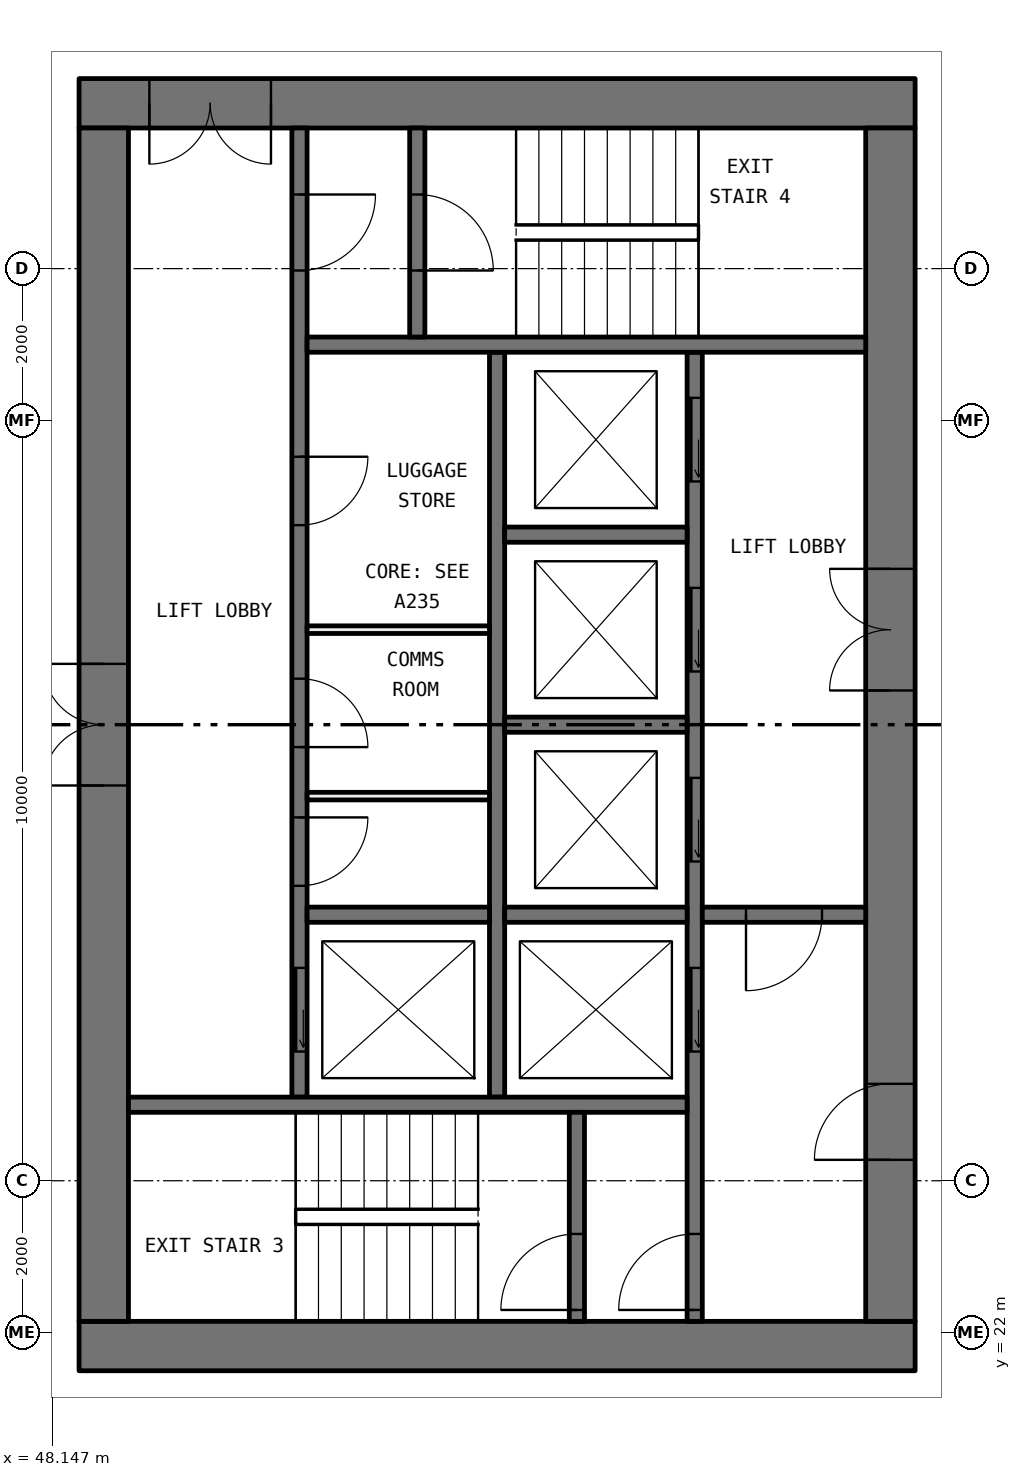
"""IFC4 building model, lengths in metres.
Left out: names, types, materials, properties, quantities, classifications, styles, units other than length and angle.
Written with IfcOpenShell. Run it as: python <this file> out.ifc"""

import sys

from ifc_helpers import new_model, si_unit, direction, frame, frame_2d, origin, place, context, subcontext, project, spatial, rectangle, extrude, element, fill, save


model = new_model("IFC4")
c1 = context("Model", 3, precision=1e-05, world=origin(), true_north=direction((0.0, 1.0)))
c2 = subcontext(c1, "Body", "Model", "MODEL_VIEW")
j1 = project(units=[si_unit("LENGTHUNIT", "METRE"), si_unit("PLANEANGLEUNIT", "RADIAN")], contexts=[c1])
p1 = place(None, origin())
s1 = spatial("IfcSite", under=j1, at=p1, CompositionType="ELEMENT")
p2 = place(p1, origin())
s2 = spatial("IfcBuilding", under=s1, at=p2, CompositionType="ELEMENT")
p3 = place(p2, frame((0.0, 0.0, 131.1)))
s3 = spatial("IfcBuildingStorey", under=s2, at=p3, CompositionType="ELEMENT", Elevation=131.1)
p4 = place(p3, frame((59.5, 21.825, 0.0), z_axis=(0.0, 0.0, 1.0), x_axis=(-1.0, 0.0, 0.0)))
e1 = element("IfcWall", 1, at=p4, inside=s3, PredefinedType="SHEAR", context=c2, shape_type="SweptSolid", body=[
    extrude(rectangle(XDim=11.0, YDim=0.65, at=frame_2d((5.5, 0.0))), origin(), (0.0, 0.0, 1.0), 3.05),
])
p5 = place(p3, frame((59.5, 38.175, 0.0), z_axis=(0.0, 0.0, 1.0), x_axis=(-1.0, 0.0, 0.0)))
e2 = element("IfcWall", 2, at=p5, inside=s3, PredefinedType="SHEAR", context=c2, shape_type="SweptSolid", body=[
    extrude(rectangle(XDim=11.0, YDim=0.65, at=frame_2d((5.5, 0.0))), origin(), (0.0, 0.0, 1.0), 3.05),
])
p6 = place(p5, frame((8.475, 0.0, 0.0)))
e3 = element("IfcOpeningElement", 3, at=p6, cuts=e2, PredefinedType="OPENING", context=c2, shape_type="SweptSolid", body=[
    extrude(rectangle(XDim=1.6, YDim=2.1, at=frame_2d((0.8, 1.05))), frame((0.0, 0.335, 0.0), z_axis=(0.0, -1.0, 0.0), x_axis=(1.0, 0.0, 0.0)), (0.0, 0.0, 1.0), 0.67),
])
p7 = place(p3, frame((59.175, 22.15, 0.0), z_axis=(0.0, 0.0, 1.0), x_axis=(0.0, 1.0, 0.0)))
e4 = element("IfcWall", 4, at=p7, inside=s3, PredefinedType="SHEAR", context=c2, shape_type="SweptSolid", body=[
    extrude(rectangle(XDim=15.7, YDim=0.65, at=frame_2d((7.85, 0.0))), origin(), (0.0, 0.0, 1.0), 3.05),
])
p8 = place(p7, frame((8.3, 0.0, 0.0)))
e5 = element("IfcOpeningElement", 5, at=p8, cuts=e4, PredefinedType="OPENING", context=c2, shape_type="SweptSolid", body=[
    extrude(rectangle(XDim=1.6, YDim=2.1, at=frame_2d((0.8, 1.05))), frame((0.0, 0.335, 0.0), z_axis=(0.0, -1.0, 0.0), x_axis=(1.0, 0.0, 0.0)), (0.0, 0.0, 1.0), 0.67),
])
p9 = place(p7, frame((2.125, 0.0, 0.0)))
e6 = element("IfcOpeningElement", 6, at=p9, cuts=e4, PredefinedType="OPENING", context=c2, shape_type="SweptSolid", body=[
    extrude(rectangle(XDim=1.0, YDim=2.1, at=frame_2d((0.5, 1.05))), frame((0.0, 0.335, 0.0), z_axis=(0.0, -1.0, 0.0), x_axis=(1.0, 0.0, 0.0)), (0.0, 0.0, 1.0), 0.67),
])
p10 = place(p3, frame((48.825, 22.15, 0.0), z_axis=(0.0, 0.0, 1.0), x_axis=(0.0, 1.0, 0.0)))
e7 = element("IfcWall", 7, at=p10, inside=s3, PredefinedType="SHEAR", context=c2, shape_type="SweptSolid", body=[
    extrude(rectangle(XDim=15.7, YDim=0.65, at=frame_2d((7.85, 0.0))), origin(), (0.0, 0.0, 1.0), 3.05),
])
p11 = place(p10, frame((7.05, 0.0, 0.0)))
e8 = element("IfcOpeningElement", 8, at=p11, cuts=e7, PredefinedType="OPENING", context=c2, shape_type="SweptSolid", body=[
    extrude(rectangle(XDim=1.6, YDim=2.1, at=frame_2d((0.8, 1.05))), frame((0.0, 0.335, 0.0), z_axis=(0.0, -1.0, 0.0), x_axis=(1.0, 0.0, 0.0)), (0.0, 0.0, 1.0), 0.67),
])
p12 = place(p3, frame((56.6, 22.15, 0.0), z_axis=(0.0, 0.0, 1.0), x_axis=(0.0, 1.0, 0.0)))
e9 = element("IfcWall", 9, at=p12, inside=s3, PredefinedType="SOLIDWALL", context=c2, shape_type="SweptSolid", body=[
    extrude(rectangle(XDim=12.75, YDim=0.2, at=frame_2d((6.375, 0.0))), origin(), (0.0, 0.0, 1.0), 3.05),
])
p13 = place(p12, frame((3.55, 0.0, 0.0)))
e10 = element("IfcOpeningElement", 10, at=p13, cuts=e9, PredefinedType="OPENING", context=c2, shape_type="SweptSolid", body=[
    extrude(rectangle(XDim=1.1, YDim=2.1, at=frame_2d((0.55, 1.05))), frame((0.0, 0.11, 0.0), z_axis=(0.0, -1.0, 0.0), x_axis=(1.0, 0.0, 0.0)), (0.0, 0.0, 1.0), 0.22),
])
p14 = place(p12, frame((6.05, 0.0, 0.0)))
e11 = element("IfcOpeningElement", 11, at=p14, cuts=e9, PredefinedType="OPENING", context=c2, shape_type="SweptSolid", body=[
    extrude(rectangle(XDim=1.1, YDim=2.1, at=frame_2d((0.55, 1.05))), frame((0.0, 0.11, 0.0), z_axis=(0.0, -1.0, 0.0), x_axis=(1.0, 0.0, 0.0)), (0.0, 0.0, 1.0), 0.22),
])
p15 = place(p12, frame((8.55, 0.0, 0.0)))
e12 = element("IfcOpeningElement", 12, at=p15, cuts=e9, PredefinedType="OPENING", context=c2, shape_type="SweptSolid", body=[
    extrude(rectangle(XDim=1.1, YDim=2.1, at=frame_2d((0.55, 1.05))), frame((0.0, 0.11, 0.0), z_axis=(0.0, -1.0, 0.0), x_axis=(1.0, 0.0, 0.0)), (0.0, 0.0, 1.0), 0.22),
])
p16 = place(p12, frame((11.05, 0.0, 0.0)))
e13 = element("IfcOpeningElement", 13, at=p16, cuts=e9, PredefinedType="OPENING", context=c2, shape_type="SweptSolid", body=[
    extrude(rectangle(XDim=1.1, YDim=2.1, at=frame_2d((0.55, 1.05))), frame((0.0, 0.11, 0.0), z_axis=(0.0, -1.0, 0.0), x_axis=(1.0, 0.0, 0.0)), (0.0, 0.0, 1.0), 0.22),
])
p17 = place(p12, frame((0.15, 0.0, 0.0)))
e14 = element("IfcOpeningElement", 14, at=p17, cuts=e9, PredefinedType="OPENING", context=c2, shape_type="SweptSolid", body=[
    extrude(rectangle(XDim=1.0, YDim=2.1, at=frame_2d((0.5, 1.05))), frame((0.0, 0.11, 0.0), z_axis=(0.0, -1.0, 0.0), x_axis=(1.0, 0.0, 0.0)), (0.0, 0.0, 1.0), 0.22),
])
p18 = place(p3, frame((51.4, 25.1, 0.0), z_axis=(0.0, 0.0, 1.0), x_axis=(0.0, 1.0, 0.0)))
e15 = element("IfcWall", 15, at=p18, inside=s3, PredefinedType="SOLIDWALL", context=c2, shape_type="SweptSolid", body=[
    extrude(rectangle(XDim=12.75, YDim=0.2, at=frame_2d((6.375, 0.0))), origin(), (0.0, 0.0, 1.0), 3.05),
])
p19 = place(p18, frame((0.6, 0.0, 0.0)))
e16 = element("IfcOpeningElement", 16, at=p19, cuts=e15, PredefinedType="OPENING", context=c2, shape_type="SweptSolid", body=[
    extrude(rectangle(XDim=1.1, YDim=2.1, at=frame_2d((0.55, 1.05))), frame((0.0, 0.11, 0.0), z_axis=(0.0, -1.0, 0.0), x_axis=(1.0, 0.0, 0.0)), (0.0, 0.0, 1.0), 0.22),
])
p20 = place(p18, frame((10.875, 0.0, 0.0)))
e17 = element("IfcOpeningElement", 17, at=p20, cuts=e15, PredefinedType="OPENING", context=c2, shape_type="SweptSolid", body=[
    extrude(rectangle(XDim=1.0, YDim=2.1, at=frame_2d((0.5, 1.05))), frame((0.0, 0.11, 0.0), z_axis=(0.0, -1.0, 0.0), x_axis=(1.0, 0.0, 0.0)), (0.0, 0.0, 1.0), 0.22),
])
p21 = place(p18, frame((2.78, 0.0, 0.0)))
e18 = element("IfcOpeningElement", 18, at=p21, cuts=e15, PredefinedType="OPENING", context=c2, shape_type="SweptSolid", body=[
    extrude(rectangle(XDim=0.9, YDim=2.1, at=frame_2d((0.45, 1.05))), frame((0.0, 0.11, 0.0), z_axis=(0.0, -1.0, 0.0), x_axis=(1.0, 0.0, 0.0)), (0.0, 0.0, 1.0), 0.22),
])
p22 = place(p18, frame((4.605, 0.0, 0.0)))
e19 = element("IfcOpeningElement", 19, at=p22, cuts=e15, PredefinedType="OPENING", context=c2, shape_type="SweptSolid", body=[
    extrude(rectangle(XDim=0.9, YDim=2.1, at=frame_2d((0.45, 1.05))), frame((0.0, 0.11, 0.0), z_axis=(0.0, -1.0, 0.0), x_axis=(1.0, 0.0, 0.0)), (0.0, 0.0, 1.0), 0.22),
])
p23 = place(p18, frame((7.525, 0.0, 0.0)))
e20 = element("IfcOpeningElement", 20, at=p23, cuts=e15, PredefinedType="OPENING", context=c2, shape_type="SweptSolid", body=[
    extrude(rectangle(XDim=0.9, YDim=2.1, at=frame_2d((0.45, 1.05))), frame((0.0, 0.11, 0.0), z_axis=(0.0, -1.0, 0.0), x_axis=(1.0, 0.0, 0.0)), (0.0, 0.0, 1.0), 0.22),
])
p24 = place(p3, frame((54.0, 25.1, 0.0), z_axis=(0.0, 0.0, 1.0), x_axis=(0.0, 1.0, 0.0)))
e21 = element("IfcWall", 21, at=p24, inside=s3, PredefinedType="SOLIDWALL", context=c2, shape_type="SweptSolid", body=[
    extrude(rectangle(XDim=9.8, YDim=0.2, at=frame_2d((4.9, 0.0))), origin(), (0.0, 0.0, 1.0), 3.05),
])
for number, where, z_axis, x_axis in (
    (22, (56.5, 25.0, 0.0), (0.0, 0.0, 1.0), (-1.0, 0.0, 0.0)),
    (23, (58.85, 35.0, 0.0), (0.0, 0.0, 1.0), (-1.0, 0.0, 0.0)),
):
    element("IfcWall", number, at=place(p3, frame(where, z_axis=z_axis, x_axis=x_axis)), inside=s3, PredefinedType="SOLIDWALL", context=c2, shape_type="SweptSolid", body=[
        extrude(rectangle(XDim=7.35, YDim=0.2, at=frame_2d((3.675, 0.0))), origin(), (0.0, 0.0, 1.0), 3.05),
    ])
p25 = place(p3, frame((58.85, 27.5, 0.0), z_axis=(0.0, 0.0, 1.0), x_axis=(-1.0, 0.0, 0.0)))
e24 = element("IfcWall", 24, at=p25, inside=s3, PredefinedType="SOLIDWALL", context=c2, shape_type="SweptSolid", body=[
    extrude(rectangle(XDim=2.15, YDim=0.2, at=frame_2d((1.075, 0.0))), origin(), (0.0, 0.0, 1.0), 3.05),
])
p26 = place(p25, frame((0.575, 0.0, 0.0)))
e25 = element("IfcOpeningElement", 25, at=p26, cuts=e24, PredefinedType="OPENING", context=c2, shape_type="SweptSolid", body=[
    extrude(rectangle(XDim=1.0, YDim=2.1, at=frame_2d((0.5, 1.05))), frame((0.0, 0.11, 0.0), z_axis=(0.0, -1.0, 0.0), x_axis=(1.0, 0.0, 0.0)), (0.0, 0.0, 1.0), 0.22),
])
p27 = place(p3, frame((55.05, 22.15, 0.0), z_axis=(0.0, 0.0, 1.0), x_axis=(0.0, 1.0, 0.0)))
e26 = element("IfcWall", 26, at=p27, inside=s3, PredefinedType="SOLIDWALL", context=c2, shape_type="SweptSolid", body=[
    extrude(rectangle(XDim=2.75, YDim=0.2, at=frame_2d((1.375, 0.0))), origin(), (0.0, 0.0, 1.0), 3.05),
])
p28 = place(p27, frame((0.15, 0.0, 0.0)))
e27 = element("IfcOpeningElement", 27, at=p28, cuts=e26, PredefinedType="OPENING", context=c2, shape_type="SweptSolid", body=[
    extrude(rectangle(XDim=1.0, YDim=2.1, at=frame_2d((0.5, 1.05))), frame((0.0, 0.11, 0.0), z_axis=(0.0, -1.0, 0.0), x_axis=(1.0, 0.0, 0.0)), (0.0, 0.0, 1.0), 0.22),
])
p29 = place(p3, frame((52.95, 35.1, 0.0), z_axis=(0.0, 0.0, 1.0), x_axis=(0.0, 1.0, 0.0)))
e28 = element("IfcWall", 28, at=p29, inside=s3, PredefinedType="SOLIDWALL", context=c2, shape_type="SweptSolid", body=[
    extrude(rectangle(XDim=2.75, YDim=0.2, at=frame_2d((1.375, 0.0))), origin(), (0.0, 0.0, 1.0), 3.05),
])
p30 = place(p29, frame((0.875, 0.0, 0.0)))
e29 = element("IfcOpeningElement", 29, at=p30, cuts=e28, PredefinedType="OPENING", context=c2, shape_type="SweptSolid", body=[
    extrude(rectangle(XDim=1.0, YDim=2.1, at=frame_2d((0.5, 1.05))), frame((0.0, 0.11, 0.0), z_axis=(0.0, -1.0, 0.0), x_axis=(1.0, 0.0, 0.0)), (0.0, 0.0, 1.0), 0.22),
])
for number, where, z_axis, x_axis in (
    (30, (56.5, 27.5, 0.0), (0.0, 0.0, 1.0), (-1.0, 0.0, 0.0)),
    (31, (56.5, 30.0, 0.0), (0.0, 0.0, 1.0), (-1.0, 0.0, 0.0)),
    (32, (56.5, 32.5, 0.0), (0.0, 0.0, 1.0), (-1.0, 0.0, 0.0)),
    (33, (53.9, 27.5, 0.0), (0.0, 0.0, 1.0), (-1.0, 0.0, 0.0)),
):
    element("IfcWall", number, at=place(p3, frame(where, z_axis=z_axis, x_axis=x_axis)), inside=s3, PredefinedType="SOLIDWALL", context=c2, shape_type="SweptSolid", body=[
        extrude(rectangle(XDim=2.4, YDim=0.2, at=frame_2d((1.2, 0.0))), origin(), (0.0, 0.0, 1.0), 3.05),
    ])
for number, where, z_axis, x_axis in (
    (34, (53.9, 29.06, 0.0), (0.0, 0.0, 1.0), (-1.0, 0.0, 0.0)),
    (35, (53.9, 31.25, 0.0), (0.0, 0.0, 1.0), (-1.0, 0.0, 0.0)),
):
    element("IfcWall", number, at=place(p3, frame(where, z_axis=z_axis, x_axis=x_axis)), inside=s3, PredefinedType="PARTITIONING", context=c2, shape_type="SweptSolid", body=[
        extrude(rectangle(XDim=2.4, YDim=0.1, at=frame_2d((1.2, 0.0))), origin(), (0.0, 0.0, 1.0), 3.05),
    ])
p31 = place(p19, origin())
e36 = element("IfcDoor", 36, at=p31, inside=s3, OperationType="SLIDING_TO_LEFT", PredefinedType="DOOR", context=c2, shape_type="SweptSolid", body=[
    extrude(rectangle(XDim=1.1, YDim=2.1, at=frame_2d((0.55, 1.05))), frame((0.0, 0.025, 0.0), z_axis=(0.0, -1.0, 0.0), x_axis=(1.0, 0.0, 0.0)), (0.0, 0.0, 1.0), 0.05),
])
fill(e16, e36)
p32 = place(p13, origin())
e37 = element("IfcDoor", 37, at=p32, inside=s3, OperationType="SLIDING_TO_LEFT", PredefinedType="DOOR", context=c2, shape_type="SweptSolid", body=[
    extrude(rectangle(XDim=1.1, YDim=2.1, at=frame_2d((0.55, 1.05))), frame((0.0, 0.025, 0.0), z_axis=(0.0, -1.0, 0.0), x_axis=(1.0, 0.0, 0.0)), (0.0, 0.0, 1.0), 0.05),
])
fill(e10, e37)
p33 = place(p14, origin())
e38 = element("IfcDoor", 38, at=p33, inside=s3, OperationType="SLIDING_TO_LEFT", PredefinedType="DOOR", context=c2, shape_type="SweptSolid", body=[
    extrude(rectangle(XDim=1.1, YDim=2.1, at=frame_2d((0.55, 1.05))), frame((0.0, 0.025, 0.0), z_axis=(0.0, -1.0, 0.0), x_axis=(1.0, 0.0, 0.0)), (0.0, 0.0, 1.0), 0.05),
])
fill(e11, e38)
p34 = place(p15, origin())
e39 = element("IfcDoor", 39, at=p34, inside=s3, OperationType="SLIDING_TO_LEFT", PredefinedType="DOOR", context=c2, shape_type="SweptSolid", body=[
    extrude(rectangle(XDim=1.1, YDim=2.1, at=frame_2d((0.55, 1.05))), frame((0.0, 0.025, 0.0), z_axis=(0.0, -1.0, 0.0), x_axis=(1.0, 0.0, 0.0)), (0.0, 0.0, 1.0), 0.05),
])
fill(e12, e39)
p35 = place(p16, origin())
e40 = element("IfcDoor", 40, at=p35, inside=s3, OperationType="SLIDING_TO_LEFT", PredefinedType="DOOR", context=c2, shape_type="SweptSolid", body=[
    extrude(rectangle(XDim=1.1, YDim=2.1, at=frame_2d((0.55, 1.05))), frame((0.0, 0.025, 0.0), z_axis=(0.0, -1.0, 0.0), x_axis=(1.0, 0.0, 0.0)), (0.0, 0.0, 1.0), 0.05),
])
fill(e13, e40)
p36 = place(p28, origin())
e41 = element("IfcDoor", 41, at=p36, inside=s3, OperationType="SINGLE_SWING_RIGHT", PredefinedType="DOOR", context=c2, shape_type="SweptSolid", body=[
    extrude(rectangle(XDim=1.0, YDim=2.1, at=frame_2d((0.5, 1.05))), frame((0.0, 0.025, 0.0), z_axis=(0.0, -1.0, 0.0), x_axis=(1.0, 0.0, 0.0)), (0.0, 0.0, 1.0), 0.05),
])
fill(e27, e41)
p37 = place(p17, origin())
e42 = element("IfcDoor", 42, at=p37, inside=s3, OperationType="SINGLE_SWING_RIGHT", PredefinedType="DOOR", context=c2, shape_type="SweptSolid", body=[
    extrude(rectangle(XDim=1.0, YDim=2.1, at=frame_2d((0.5, 1.05))), frame((0.0, 0.025, 0.0), z_axis=(0.0, -1.0, 0.0), x_axis=(1.0, 0.0, 0.0)), (0.0, 0.0, 1.0), 0.05),
])
fill(e14, e42)
p38 = place(p20, frame((1.0, 0.0, 0.0), x_axis=(-1.0, 0.0, 0.0)))
e43 = element("IfcDoor", 43, at=p38, inside=s3, OperationType="SINGLE_SWING_RIGHT", PredefinedType="DOOR", context=c2, shape_type="SweptSolid", body=[
    extrude(rectangle(XDim=1.0, YDim=2.1, at=frame_2d((0.5, 1.05))), frame((0.0, 0.025, 0.0), z_axis=(0.0, -1.0, 0.0), x_axis=(1.0, 0.0, 0.0)), (0.0, 0.0, 1.0), 0.05),
])
fill(e17, e43)
p39 = place(p30, frame((1.0, 0.0, 0.0), x_axis=(-1.0, 0.0, 0.0)))
e44 = element("IfcDoor", 44, at=p39, inside=s3, OperationType="SINGLE_SWING_LEFT", PredefinedType="DOOR", context=c2, shape_type="SweptSolid", body=[
    extrude(rectangle(XDim=1.0, YDim=2.1, at=frame_2d((0.5, 1.05))), frame((0.0, 0.025, 0.0), z_axis=(0.0, -1.0, 0.0), x_axis=(1.0, 0.0, 0.0)), (0.0, 0.0, 1.0), 0.05),
])
fill(e29, e44)
p40 = place(p26, origin())
e45 = element("IfcDoor", 45, at=p40, inside=s3, OperationType="SINGLE_SWING_LEFT", PredefinedType="DOOR", context=c2, shape_type="SweptSolid", body=[
    extrude(rectangle(XDim=1.0, YDim=2.1, at=frame_2d((0.5, 1.05))), frame((0.0, 0.025, 0.0), z_axis=(0.0, -1.0, 0.0), x_axis=(1.0, 0.0, 0.0)), (0.0, 0.0, 1.0), 0.05),
])
fill(e25, e45)
p41 = place(p8, origin())
e46 = element("IfcDoor", 46, at=p41, inside=s3, OperationType="DOUBLE_DOOR_SINGLE_SWING", PredefinedType="DOOR", context=c2, shape_type="SweptSolid", body=[
    extrude(rectangle(XDim=1.6, YDim=2.1, at=frame_2d((0.8, 1.05))), frame((0.0, 0.025, 0.0), z_axis=(0.0, -1.0, 0.0), x_axis=(1.0, 0.0, 0.0)), (0.0, 0.0, 1.0), 0.05),
])
fill(e5, e46)
p42 = place(p9, origin())
e47 = element("IfcDoor", 47, at=p42, inside=s3, OperationType="SINGLE_SWING_RIGHT", PredefinedType="DOOR", context=c2, shape_type="SweptSolid", body=[
    extrude(rectangle(XDim=1.0, YDim=2.1, at=frame_2d((0.5, 1.05))), frame((0.0, 0.025, 0.0), z_axis=(0.0, -1.0, 0.0), x_axis=(1.0, 0.0, 0.0)), (0.0, 0.0, 1.0), 0.05),
])
fill(e6, e47)
p43 = place(p6, origin())
e48 = element("IfcDoor", 48, at=p43, inside=s3, OperationType="DOUBLE_DOOR_SINGLE_SWING", PredefinedType="DOOR", context=c2, shape_type="SweptSolid", body=[
    extrude(rectangle(XDim=1.6, YDim=2.1, at=frame_2d((0.8, 1.05))), frame((0.0, 0.025, 0.0), z_axis=(0.0, -1.0, 0.0), x_axis=(1.0, 0.0, 0.0)), (0.0, 0.0, 1.0), 0.05),
])
fill(e3, e48)
p44 = place(p11, origin())
e49 = element("IfcDoor", 49, at=p44, inside=s3, OperationType="DOUBLE_DOOR_SINGLE_SWING", PredefinedType="DOOR", context=c2, shape_type="SweptSolid", body=[
    extrude(rectangle(XDim=1.6, YDim=2.1, at=frame_2d((0.8, 1.05))), frame((0.0, 0.025, 0.0), z_axis=(0.0, -1.0, 0.0), x_axis=(1.0, 0.0, 0.0)), (0.0, 0.0, 1.0), 0.05),
])
fill(e8, e49)
p45 = place(p21, frame((0.9, 0.0, 0.0), x_axis=(-1.0, 0.0, 0.0)))
e50 = element("IfcDoor", 50, at=p45, inside=s3, OperationType="SINGLE_SWING_RIGHT", PredefinedType="DOOR", context=c2, shape_type="SweptSolid", body=[
    extrude(rectangle(XDim=0.9, YDim=2.1, at=frame_2d((0.45, 1.05))), frame((0.0, 0.025, 0.0), z_axis=(0.0, -1.0, 0.0), x_axis=(1.0, 0.0, 0.0)), (0.0, 0.0, 1.0), 0.05),
])
fill(e18, e50)
p46 = place(p22, frame((0.9, 0.0, 0.0), x_axis=(-1.0, 0.0, 0.0)))
e51 = element("IfcDoor", 51, at=p46, inside=s3, OperationType="SINGLE_SWING_LEFT", PredefinedType="DOOR", context=c2, shape_type="SweptSolid", body=[
    extrude(rectangle(XDim=0.9, YDim=2.1, at=frame_2d((0.45, 1.05))), frame((0.0, 0.025, 0.0), z_axis=(0.0, -1.0, 0.0), x_axis=(1.0, 0.0, 0.0)), (0.0, 0.0, 1.0), 0.05),
])
fill(e19, e51)
p47 = place(p23, frame((0.9, 0.0, 0.0), x_axis=(-1.0, 0.0, 0.0)))
e52 = element("IfcDoor", 52, at=p47, inside=s3, OperationType="SINGLE_SWING_RIGHT", PredefinedType="DOOR", context=c2, shape_type="SweptSolid", body=[
    extrude(rectangle(XDim=0.9, YDim=2.1, at=frame_2d((0.45, 1.05))), frame((0.0, 0.025, 0.0), z_axis=(0.0, -1.0, 0.0), x_axis=(1.0, 0.0, 0.0)), (0.0, 0.0, 1.0), 0.05),
])
fill(e20, e52)
save(model, sys.argv[1])
